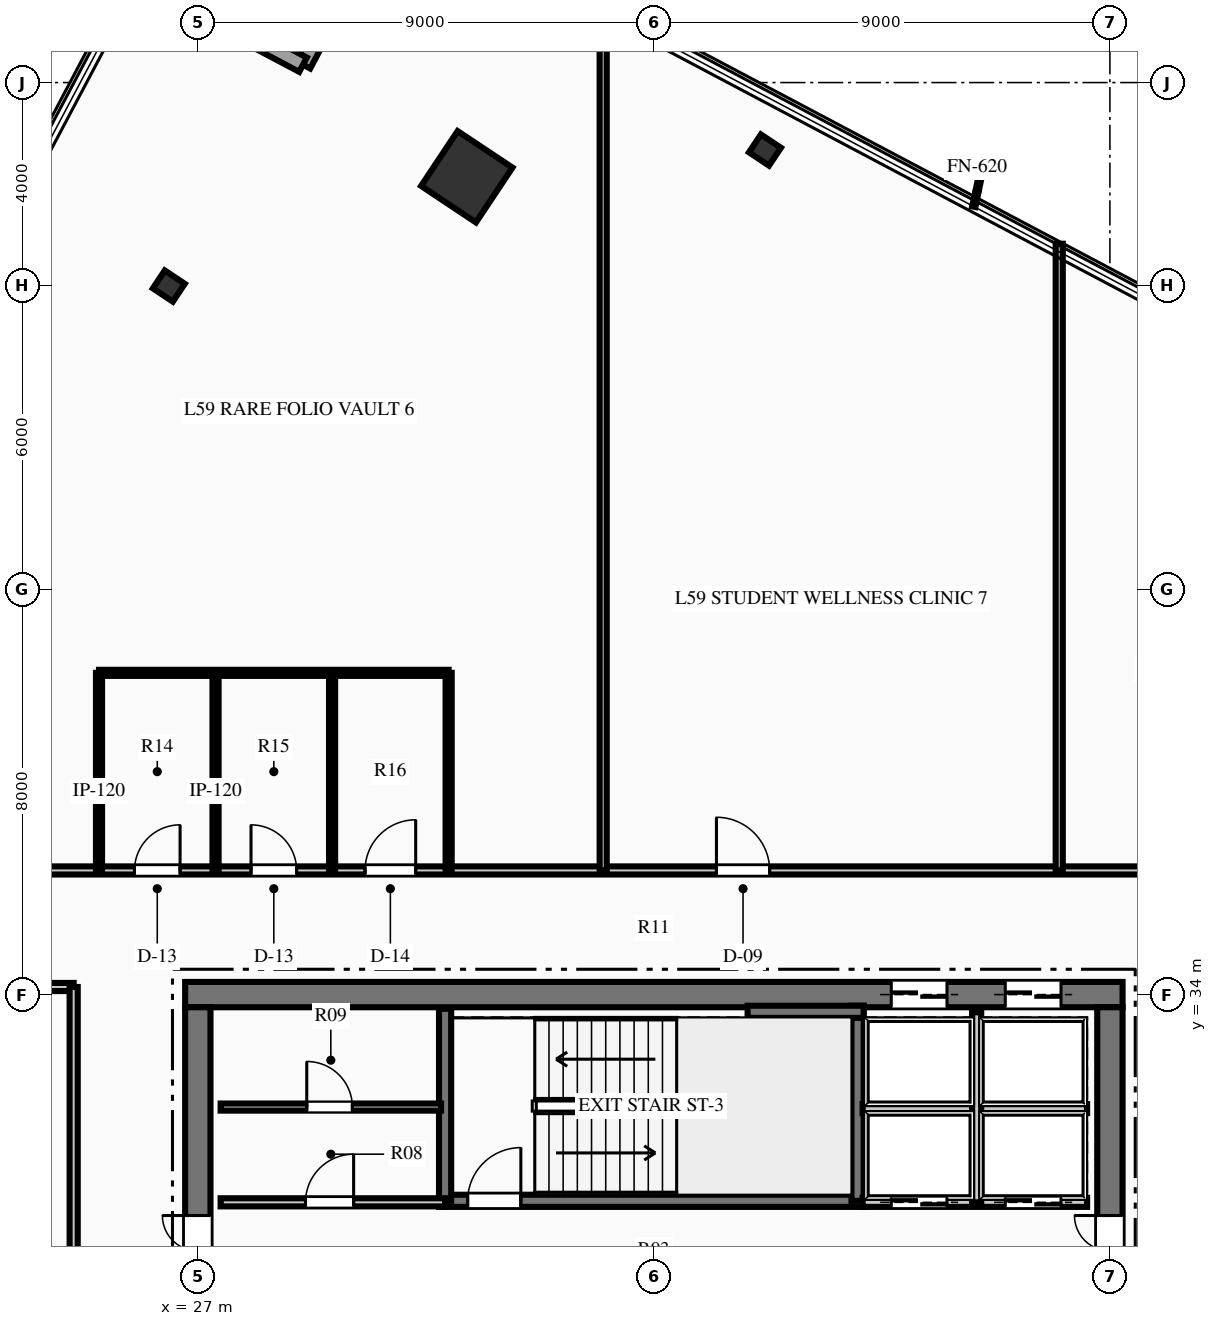
"""IFC4 building model, lengths in metres.
Left out: names, types, materials, properties, quantities, classifications, styles, units other than length and angle.
Written with IfcOpenShell. Run it as: python <this file> out.ifc"""

import sys

from ifc_helpers import new_model, si_unit, direction, frame, frame_2d, origin, origin_2d, place, context, subcontext, project, spatial, rectangle, hollow_rectangle, i_section, extrude, element, fill, save


model = new_model("IFC4")
c1 = context("Model", 3, precision=1e-05, world=origin(), true_north=direction((0.0, 1.0)))
c2 = subcontext(c1, "Body", "Model", "MODEL_VIEW")
j1 = project(units=[si_unit("LENGTHUNIT", "METRE"), si_unit("PLANEANGLEUNIT", "RADIAN")], contexts=[c1])
p1 = place(None, origin())
s1 = spatial("IfcSite", under=j1, at=p1, CompositionType="ELEMENT")
p2 = place(p1, origin())
s2 = spatial("IfcBuilding", under=s1, at=p2, CompositionType="ELEMENT")
p3 = place(p2, frame((0.0, 0.0, 235.95)))
s3 = spatial("IfcBuildingStorey", under=s2, at=p3, CompositionType="ELEMENT", Elevation=235.95)
p4 = place(p3, frame((26.75, 34.0, 0.0), z_axis=(0.0, 0.0, 1.0), x_axis=(1.0, 0.0, 0.0)))
e1 = element("IfcWall", 1, at=p4, inside=s3, PredefinedType="SHEAR", context=c2, shape_type="SweptSolid", body=[
    extrude(rectangle(XDim=18.5, YDim=0.5, at=frame_2d((9.25, 0.0))), origin(), (0.0, 0.0, 1.0), 3.75),
])
p5 = place(p4, frame((13.935, 0.0, 0.0)))
e2 = element("IfcOpeningElement", 2, at=p5, cuts=e1, PredefinedType="OPENING", context=c2, shape_type="SweptSolid", body=[
    extrude(rectangle(XDim=1.1, YDim=2.15, at=frame_2d((0.55, 1.075))), frame((0.0, 0.26, 0.0), z_axis=(0.0, -1.0, 0.0), x_axis=(1.0, 0.0, 0.0)), (0.0, 0.0, 1.0), 0.52),
])
p6 = place(p4, frame((16.185, 0.0, 0.0)))
e3 = element("IfcOpeningElement", 3, at=p6, cuts=e1, PredefinedType="OPENING", context=c2, shape_type="SweptSolid", body=[
    extrude(rectangle(XDim=1.1, YDim=2.15, at=frame_2d((0.55, 1.075))), frame((0.0, 0.26, 0.0), z_axis=(0.0, -1.0, 0.0), x_axis=(1.0, 0.0, 0.0)), (0.0, 0.0, 1.0), 0.52),
])
p7 = place(p3, frame((27.0, 18.25, 0.0), z_axis=(0.0, 0.0, 1.0), x_axis=(0.0, 1.0, 0.0)))
e4 = element("IfcWall", 4, at=p7, inside=s3, PredefinedType="SHEAR", context=c2, shape_type="SweptSolid", body=[
    extrude(rectangle(XDim=15.5, YDim=0.5, at=frame_2d((7.75, 0.0))), origin(), (0.0, 0.0, 1.0), 3.75),
])
p8 = place(p7, frame((9.99, 0.0, 0.0)))
e5 = element("IfcOpeningElement", 5, at=p8, cuts=e4, PredefinedType="OPENING", context=c2, shape_type="SweptSolid", body=[
    extrude(rectangle(XDim=1.4, YDim=2.2, at=frame_2d((0.7, 1.1))), frame((0.0, 0.26, 0.0), z_axis=(0.0, -1.0, 0.0), x_axis=(1.0, 0.0, 0.0)), (0.0, 0.0, 1.0), 0.52),
])
p9 = place(p3, frame((45.0, 18.25, 0.0), z_axis=(0.0, 0.0, 1.0), x_axis=(0.0, 1.0, 0.0)))
e6 = element("IfcWall", 6, at=p9, inside=s3, PredefinedType="SHEAR", context=c2, shape_type="SweptSolid", body=[
    extrude(rectangle(XDim=15.5, YDim=0.5, at=frame_2d((7.75, 0.0))), origin(), (0.0, 0.0, 1.0), 3.75),
])
p10 = place(p9, frame((9.99, 0.0, 0.0)))
e7 = element("IfcOpeningElement", 7, at=p10, cuts=e6, PredefinedType="OPENING", context=c2, shape_type="SweptSolid", body=[
    extrude(rectangle(XDim=1.4, YDim=2.2, at=frame_2d((0.7, 1.1))), frame((0.0, 0.26, 0.0), z_axis=(0.0, -1.0, 0.0), x_axis=(1.0, 0.0, 0.0)), (0.0, 0.0, 1.0), 0.52),
])
p11 = place(p3, frame((31.76, 29.93, 0.0), z_axis=(0.0, 0.0, 1.0), x_axis=(1.0, 0.0, 0.0)))
e8 = element("IfcWall", 8, at=p11, inside=s3, PredefinedType="SHEAR", context=c2, shape_type="SweptSolid", body=[
    extrude(rectangle(XDim=8.38, YDim=0.24, at=frame_2d((4.19, 0.0))), origin(), (0.0, 0.0, 1.0), 3.75),
])
p12 = place(p11, frame((0.565, 0.0, 0.0)))
e9 = element("IfcOpeningElement", 9, at=p12, cuts=e8, PredefinedType="OPENING", context=c2, shape_type="SweptSolid", body=[
    extrude(rectangle(XDim=1.05, YDim=2.15, at=frame_2d((0.525, 1.075))), frame((0.0, 0.13, 0.0), z_axis=(0.0, -1.0, 0.0), x_axis=(1.0, 0.0, 0.0)), (0.0, 0.0, 1.0), 0.26),
])
p13 = place(p3, frame((31.88, 29.93, 0.0), z_axis=(0.0, 0.0, 1.0), x_axis=(0.0, 1.0, 0.0)))
e10 = element("IfcWall", 10, at=p13, inside=s3, PredefinedType="SHEAR", context=c2, shape_type="SweptSolid", body=[
    extrude(rectangle(XDim=3.79, YDim=0.24, at=frame_2d((1.895, 0.0))), origin(), (0.0, 0.0, 1.0), 3.75),
])
p14 = place(p3, frame((40.02, 29.93, 0.0), z_axis=(0.0, 0.0, 1.0), x_axis=(0.0, 1.0, 0.0)))
e11 = element("IfcWall", 11, at=p14, inside=s3, PredefinedType="SHEAR", context=c2, shape_type="SweptSolid", body=[
    extrude(rectangle(XDim=3.85, YDim=0.24, at=frame_2d((1.925, 0.0))), origin(), (0.0, 0.0, 1.0), 3.75),
])
p15 = place(p3, frame((37.85, 33.66, 0.0), z_axis=(0.0, 0.0, 1.0), x_axis=(1.0, 0.0, 0.0)))
e12 = element("IfcWall", 12, at=p15, inside=s3, PredefinedType="SHEAR", context=c2, shape_type="SweptSolid", body=[
    extrude(rectangle(XDim=2.29, YDim=0.24, at=frame_2d((1.145, 0.0))), origin(), (0.0, 0.0, 1.0), 3.75),
])
p16 = place(p3, frame((32.308, 50.141, 0.0), z_axis=(0.0, 0.0, 1.0), x_axis=(0.554118199338, 0.832437998389, 0.0)))
e13 = element("IfcColumn", 13, at=p16, inside=s3, PredefinedType="COLUMN", context=c2, shape_type="SweptSolid", body=[
    extrude(hollow_rectangle(XDim=1.3, YDim=1.3, WallThickness=0.06, at=origin_2d()), origin(), (0.0, 0.0, 1.0), 3.75),
])
for number, where, z_axis, x_axis in (
    (14, (38.193, 50.668, 0.0), (0.0, 0.0, 1.0), (0.554, 0.832, 0.0)),
    (15, (26.428, 47.984, 0.0), (0.0, 0.0, 1.0), (0.554, 0.832, 0.0)),
):
    element("IfcColumn", number, at=place(p3, frame(where, z_axis=z_axis, x_axis=x_axis)), inside=s3, PredefinedType="COLUMN", context=c2, shape_type="SweptSolid", body=[
        extrude(i_section(OverallWidth=0.424, OverallDepth=0.474, WebThickness=0.048, FlangeThickness=0.077, at=origin_2d()), origin(), (0.0, 0.0, 1.0), 3.75),
    ])
p17 = place(p3, frame((29.076, 52.353, 0.0), z_axis=(0.0, 0.0, 1.0), x_axis=(0.467925110021, 0.883768120839, 0.0)))
e16 = element("IfcWall", 16, at=p17, inside=s3, PredefinedType="STANDARD", context=c2, shape_type="SweptSolid", body=[
    extrude(rectangle(XDim=3.9, YDim=0.32, at=frame_2d((1.95, 0.0))), origin(), (0.0, 0.0, 1.0), 3.4),
])
p18 = place(p3, frame((25.63, 54.178, 0.0), z_axis=(0.0, 0.0, 1.0), x_axis=(0.883754413477, -0.46795099814, 0.0)))
e17 = element("IfcWall", 17, at=p18, inside=s3, PredefinedType="STANDARD", context=c2, shape_type="SweptSolid", body=[
    extrude(rectangle(XDim=3.9, YDim=0.32, at=frame_2d((1.95, 0.0))), origin(), (0.0, 0.0, 1.0), 3.4),
])
p19 = place(p18, frame((1.25, 0.0, 0.85)))
e18 = element("IfcOpeningElement", 18, at=p19, cuts=e17, PredefinedType="OPENING", context=c2, shape_type="SweptSolid", body=[
    extrude(rectangle(XDim=1.4, YDim=2.0, at=frame_2d((0.7, 1.0))), frame((0.0, 0.17, 0.0), z_axis=(0.0, -1.0, 0.0), x_axis=(1.0, 0.0, 0.0)), (0.0, 0.0, 1.0), 0.34),
])
p20 = place(p3, frame((27.45, 29.9, 0.0), z_axis=(0.0, 0.0, 1.0), x_axis=(1.0, 0.0, 0.0)))
e19 = element("IfcWall", 19, at=p20, inside=s3, PredefinedType="PARTITIONING", context=c2, shape_type="SweptSolid", body=[
    extrude(rectangle(XDim=4.43, YDim=0.16, at=frame_2d((2.215, 0.0))), origin(), (0.0, 0.0, 1.0), 3.4),
])
p21 = place(p20, frame((1.675, 0.0, 0.0)))
e20 = element("IfcOpeningElement", 20, at=p21, cuts=e19, PredefinedType="OPENING", context=c2, shape_type="SweptSolid", body=[
    extrude(rectangle(XDim=0.95, YDim=2.15, at=frame_2d((0.475, 1.075))), frame((0.0, 0.09, 0.0), z_axis=(0.0, -1.0, 0.0), x_axis=(1.0, 0.0, 0.0)), (0.0, 0.0, 1.0), 0.18),
])
p22 = place(p3, frame((27.45, 31.78, 0.0), z_axis=(0.0, 0.0, 1.0), x_axis=(1.0, 0.0, 0.0)))
e21 = element("IfcWall", 21, at=p22, inside=s3, PredefinedType="PARTITIONING", context=c2, shape_type="SweptSolid", body=[
    extrude(rectangle(XDim=4.35, YDim=0.14, at=frame_2d((2.175, 0.0))), origin(), (0.0, 0.0, 1.0), 3.4),
])
p23 = place(p22, frame((1.7, 0.0, 0.0)))
e22 = element("IfcOpeningElement", 22, at=p23, cuts=e21, PredefinedType="OPENING", context=c2, shape_type="SweptSolid", body=[
    extrude(rectangle(XDim=0.9, YDim=2.15, at=frame_2d((0.45, 1.075))), frame((0.0, 0.08, 0.0), z_axis=(0.0, -1.0, 0.0), x_axis=(1.0, 0.0, 0.0)), (0.0, 0.0, 1.0), 0.16),
])
p24 = place(p3, frame((40.12, 29.9, 0.0), z_axis=(0.0, 0.0, 1.0), x_axis=(1.0, 0.0, 0.0)))
e23 = element("IfcWall", 23, at=p24, inside=s3, PredefinedType="PARTITIONING", context=c2, shape_type="SweptSolid", body=[
    extrude(rectangle(XDim=4.43, YDim=0.18, at=frame_2d((2.215, 0.0))), origin(), (0.0, 0.0, 1.0), 3.4),
])
p25 = place(p24, frame((0.565, 0.0, 0.0)))
e24 = element("IfcOpeningElement", 24, at=p25, cuts=e23, PredefinedType="OPENING", context=c2, shape_type="SweptSolid", body=[
    extrude(rectangle(XDim=1.1, YDim=2.15, at=frame_2d((0.55, 1.075))), frame((0.0, 0.1, 0.0), z_axis=(0.0, -1.0, 0.0), x_axis=(1.0, 0.0, 0.0)), (0.0, 0.0, 1.0), 0.2),
])
p26 = place(p24, frame((2.815, 0.0, 0.0)))
e25 = element("IfcOpeningElement", 25, at=p26, cuts=e23, PredefinedType="OPENING", context=c2, shape_type="SweptSolid", body=[
    extrude(rectangle(XDim=1.1, YDim=2.15, at=frame_2d((0.55, 1.075))), frame((0.0, 0.1, 0.0), z_axis=(0.0, -1.0, 0.0), x_axis=(1.0, 0.0, 0.0)), (0.0, 0.0, 1.0), 0.2),
])
p27 = place(p3, frame((40.12, 31.75, 0.0), z_axis=(0.0, 0.0, 1.0), x_axis=(1.0, 0.0, 0.0)))
e26 = element("IfcWall", 26, at=p27, inside=s3, PredefinedType="PARTITIONING", context=c2, shape_type="SweptSolid", body=[
    extrude(rectangle(XDim=4.43, YDim=0.18, at=frame_2d((2.215, 0.0))), origin(), (0.0, 0.0, 1.0), 3.4),
])
p28 = place(p3, frame((42.37, 29.9, 0.0), z_axis=(0.0, 0.0, 1.0), x_axis=(0.0, 1.0, 0.0)))
e27 = element("IfcWall", 27, at=p28, inside=s3, PredefinedType="PARTITIONING", context=c2, shape_type="SweptSolid", body=[
    extrude(rectangle(XDim=3.75, YDim=0.18, at=frame_2d((1.875, 0.0))), origin(), (0.0, 0.0, 1.0), 3.4),
])
p29 = place(p3, frame((18.2, 36.45, 0.0), z_axis=(0.0, 0.0, 1.0), x_axis=(1.0, 0.0, 0.0)))
e28 = element("IfcWall", 28, at=p29, inside=s3, PredefinedType="PARTITIONING", context=c2, shape_type="SweptSolid", body=[
    extrude(rectangle(XDim=35.6, YDim=0.16, at=frame_2d((17.8, 0.0))), origin(), (0.0, 0.0, 1.0), 2.779),
])
p30 = place(p29, frame((7.55, 0.0, 0.0)))
e29 = element("IfcOpeningElement", 29, at=p30, cuts=e28, PredefinedType="OPENING", context=c2, shape_type="SweptSolid", body=[
    extrude(rectangle(XDim=0.9, YDim=2.15, at=frame_2d((0.45, 1.075))), frame((0.0, 0.09, 0.0), z_axis=(0.0, -1.0, 0.0), x_axis=(1.0, 0.0, 0.0)), (0.0, 0.0, 1.0), 0.18),
])
p31 = place(p29, frame((9.85, 0.0, 0.0)))
e30 = element("IfcOpeningElement", 30, at=p31, cuts=e28, PredefinedType="OPENING", context=c2, shape_type="SweptSolid", body=[
    extrude(rectangle(XDim=0.9, YDim=2.15, at=frame_2d((0.45, 1.075))), frame((0.0, 0.09, 0.0), z_axis=(0.0, -1.0, 0.0), x_axis=(1.0, 0.0, 0.0)), (0.0, 0.0, 1.0), 0.18),
])
p32 = place(p29, frame((12.1, 0.0, 0.0)))
e31 = element("IfcOpeningElement", 31, at=p32, cuts=e28, PredefinedType="OPENING", context=c2, shape_type="SweptSolid", body=[
    extrude(rectangle(XDim=1.0, YDim=2.15, at=frame_2d((0.5, 1.075))), frame((0.0, 0.09, 0.0), z_axis=(0.0, -1.0, 0.0), x_axis=(1.0, 0.0, 0.0)), (0.0, 0.0, 1.0), 0.18),
])
p33 = place(p29, frame((4.345, 0.0, 0.0)))
e32 = element("IfcOpeningElement", 32, at=p33, cuts=e28, PredefinedType="OPENING", context=c2, shape_type="SweptSolid", body=[
    extrude(rectangle(XDim=1.05, YDim=2.15, at=frame_2d((0.525, 1.075))), frame((0.0, 0.09, 0.0), z_axis=(0.0, -1.0, 0.0), x_axis=(1.0, 0.0, 0.0)), (0.0, 0.0, 1.0), 0.18),
])
p34 = place(p29, frame((19.035, 0.0, 0.0)))
e33 = element("IfcOpeningElement", 33, at=p34, cuts=e28, PredefinedType="OPENING", context=c2, shape_type="SweptSolid", body=[
    extrude(rectangle(XDim=1.05, YDim=2.15, at=frame_2d((0.525, 1.075))), frame((0.0, 0.09, 0.0), z_axis=(0.0, -1.0, 0.0), x_axis=(1.0, 0.0, 0.0)), (0.0, 0.0, 1.0), 0.18),
])
p35 = place(p29, frame((31.833, 0.0, 0.0)))
e34 = element("IfcOpeningElement", 34, at=p35, cuts=e28, PredefinedType="OPENING", context=c2, shape_type="SweptSolid", body=[
    extrude(rectangle(XDim=1.05, YDim=2.15, at=frame_2d((0.525, 1.075))), frame((0.0, 0.09, 0.0), z_axis=(0.0, -1.0, 0.0), x_axis=(1.0, 0.0, 0.0)), (0.0, 0.0, 1.0), 0.18),
])
p36 = place(p3, frame((18.2, 34.15, 0.0), z_axis=(0.0, 0.0, 1.0), x_axis=(1.0, 0.0, 0.0)))
e35 = element("IfcWall", 35, at=p36, inside=s3, PredefinedType="PARTITIONING", context=c2, shape_type="SweptSolid", body=[
    extrude(rectangle(XDim=6.35, YDim=0.16, at=frame_2d((3.175, 0.0))), origin(), (0.0, 0.0, 1.0), 3.4),
])
p37 = place(p3, frame((24.55, 17.85, 0.0), z_axis=(0.0, 0.0, 1.0), x_axis=(0.0, 1.0, 0.0)))
e36 = element("IfcWall", 36, at=p37, inside=s3, PredefinedType="PARTITIONING", context=c2, shape_type="SweptSolid", body=[
    extrude(rectangle(XDim=16.3, YDim=0.16, at=frame_2d((8.15, 0.0))), origin(), (0.0, 0.0, 1.0), 3.4),
])
p38 = place(p37, frame((2.775, 0.0, 0.0)))
e37 = element("IfcOpeningElement", 37, at=p38, cuts=e36, PredefinedType="OPENING", context=c2, shape_type="SweptSolid", body=[
    extrude(rectangle(XDim=0.95, YDim=2.15, at=frame_2d((0.475, 1.075))), frame((0.0, 0.09, 0.0), z_axis=(0.0, -1.0, 0.0), x_axis=(1.0, 0.0, 0.0)), (0.0, 0.0, 1.0), 0.18),
])
p39 = place(p37, frame((8.729, 0.0, 0.0)))
e38 = element("IfcOpeningElement", 38, at=p39, cuts=e36, PredefinedType="OPENING", context=c2, shape_type="SweptSolid", body=[
    extrude(rectangle(XDim=1.05, YDim=2.15, at=frame_2d((0.525, 1.075))), frame((0.0, 0.09, 0.0), z_axis=(0.0, -1.0, 0.0), x_axis=(1.0, 0.0, 0.0)), (0.0, 0.0, 1.0), 0.18),
])
for number, where, z_axis, x_axis in (
    (39, (25.05, 36.45, 0.0), (0.0, 0.0, 1.0), (0.0, 1.0, 0.0)),
    (40, (27.35, 36.45, 0.0), (0.0, 0.0, 1.0), (0.0, 1.0, 0.0)),
    (41, (29.65, 36.45, 0.0), (0.0, 0.0, 1.0), (0.0, 1.0, 0.0)),
):
    element("IfcWall", number, at=place(p3, frame(where, z_axis=z_axis, x_axis=x_axis)), inside=s3, PredefinedType="PARTITIONING", context=c2, shape_type="SweptSolid", body=[
        extrude(rectangle(XDim=3.9, YDim=0.12, at=frame_2d((1.95, 0.0))), origin(), (0.0, 0.0, 1.0), 3.4),
    ])
p40 = place(p3, frame((31.95, 36.45, 0.0), z_axis=(0.0, 0.0, 1.0), x_axis=(0.0, 1.0, 0.0)))
e42 = element("IfcWall", 42, at=p40, inside=s3, PredefinedType="PARTITIONING", context=c2, shape_type="SweptSolid", body=[
    extrude(rectangle(XDim=3.9, YDim=0.12, at=frame_2d((1.95, 0.0))), origin(), (0.0, 0.0, 1.0), 2.779),
])
p41 = place(p3, frame((25.05, 40.35, 0.0), z_axis=(0.0, 0.0, 1.0), x_axis=(1.0, 0.0, 0.0)))
e43 = element("IfcWall", 43, at=p41, inside=s3, PredefinedType="PARTITIONING", context=c2, shape_type="SweptSolid", body=[
    extrude(rectangle(XDim=6.9, YDim=0.12, at=frame_2d((3.45, 0.0))), origin(), (0.0, 0.0, 1.0), 3.4),
])
p42 = place(p3, frame((35.0, 36.45, 0.0), z_axis=(0.0, 0.0, 1.0), x_axis=(0.0, 1.0, 0.0)))
e44 = element("IfcWall", 44, at=p42, inside=s3, PredefinedType="PARTITIONING", context=c2, shape_type="SweptSolid", body=[
    extrude(rectangle(XDim=17.134, YDim=0.14, at=frame_2d((8.567, 0.0))), origin(), (0.0, 0.0, 1.0), 3.4),
])
p43 = place(p3, frame((44.0, 36.45, 0.0), z_axis=(0.0, 0.0, 1.0), x_axis=(0.0, 1.0, 0.0)))
e45 = element("IfcWall", 45, at=p43, inside=s3, PredefinedType="PARTITIONING", context=c2, shape_type="SweptSolid", body=[
    extrude(rectangle(XDim=12.369, YDim=0.14, at=frame_2d((6.185, 0.0))), origin(), (0.0, 0.0, 1.0), 3.4),
])
p44 = place(p21, origin())
e46 = element("IfcDoor", 46, at=p44, inside=s3, OperationType="SINGLE_SWING_RIGHT", PredefinedType="DOOR", context=c2, shape_type="SweptSolid", body=[
    extrude(rectangle(XDim=0.95, YDim=2.15, at=frame_2d((0.475, 1.075))), frame((0.0, 0.025, 0.0), z_axis=(0.0, -1.0, 0.0), x_axis=(1.0, 0.0, 0.0)), (0.0, 0.0, 1.0), 0.05),
])
fill(e20, e46)
p45 = place(p23, origin())
e47 = element("IfcDoor", 47, at=p45, inside=s3, OperationType="SINGLE_SWING_LEFT", PredefinedType="DOOR", context=c2, shape_type="SweptSolid", body=[
    extrude(rectangle(XDim=0.9, YDim=2.15, at=frame_2d((0.45, 1.075))), frame((0.0, 0.025, 0.0), z_axis=(0.0, -1.0, 0.0), x_axis=(1.0, 0.0, 0.0)), (0.0, 0.0, 1.0), 0.05),
])
fill(e22, e47)
p46 = place(p12, origin())
e48 = element("IfcDoor", 48, at=p46, inside=s3, OperationType="SINGLE_SWING_RIGHT", PredefinedType="DOOR", context=c2, shape_type="SweptSolid", body=[
    extrude(rectangle(XDim=1.05, YDim=2.15, at=frame_2d((0.525, 1.075))), frame((0.0, 0.025, 0.0), z_axis=(0.0, -1.0, 0.0), x_axis=(1.0, 0.0, 0.0)), (0.0, 0.0, 1.0), 0.05),
])
fill(e9, e48)
p47 = place(p8, origin())
e49 = element("IfcDoor", 49, at=p47, inside=s3, OperationType="DOUBLE_DOOR_SINGLE_SWING", PredefinedType="DOOR", context=c2, shape_type="SweptSolid", body=[
    extrude(rectangle(XDim=1.4, YDim=2.2, at=frame_2d((0.7, 1.1))), frame((0.0, 0.025, 0.0), z_axis=(0.0, -1.0, 0.0), x_axis=(1.0, 0.0, 0.0)), (0.0, 0.0, 1.0), 0.05),
])
fill(e5, e49)
p48 = place(p10, origin())
e50 = element("IfcDoor", 50, at=p48, inside=s3, OperationType="DOUBLE_DOOR_SINGLE_SWING", PredefinedType="DOOR", context=c2, shape_type="SweptSolid", body=[
    extrude(rectangle(XDim=1.4, YDim=2.2, at=frame_2d((0.7, 1.1))), frame((0.0, 0.025, 0.0), z_axis=(0.0, -1.0, 0.0), x_axis=(1.0, 0.0, 0.0)), (0.0, 0.0, 1.0), 0.05),
])
fill(e7, e50)
p49 = place(p30, origin())
e51 = element("IfcDoor", 51, at=p49, inside=s3, OperationType="SINGLE_SWING_RIGHT", PredefinedType="DOOR", context=c2, shape_type="SweptSolid", body=[
    extrude(rectangle(XDim=0.9, YDim=2.15, at=frame_2d((0.45, 1.075))), frame((0.0, 0.025, 0.0), z_axis=(0.0, -1.0, 0.0), x_axis=(1.0, 0.0, 0.0)), (0.0, 0.0, 1.0), 0.05),
])
fill(e29, e51)
p50 = place(p31, origin())
e52 = element("IfcDoor", 52, at=p50, inside=s3, OperationType="SINGLE_SWING_LEFT", PredefinedType="DOOR", context=c2, shape_type="SweptSolid", body=[
    extrude(rectangle(XDim=0.9, YDim=2.15, at=frame_2d((0.45, 1.075))), frame((0.0, 0.025, 0.0), z_axis=(0.0, -1.0, 0.0), x_axis=(1.0, 0.0, 0.0)), (0.0, 0.0, 1.0), 0.05),
])
fill(e30, e52)
p51 = place(p32, origin())
e53 = element("IfcDoor", 53, at=p51, inside=s3, OperationType="SINGLE_SWING_RIGHT", PredefinedType="DOOR", context=c2, shape_type="SweptSolid", body=[
    extrude(rectangle(XDim=1.0, YDim=2.15, at=frame_2d((0.5, 1.075))), frame((0.0, 0.025, 0.0), z_axis=(0.0, -1.0, 0.0), x_axis=(1.0, 0.0, 0.0)), (0.0, 0.0, 1.0), 0.05),
])
fill(e31, e53)
p52 = place(p34, origin())
e54 = element("IfcDoor", 54, at=p52, inside=s3, OperationType="SINGLE_SWING_LEFT", PredefinedType="DOOR", context=c2, shape_type="SweptSolid", body=[
    extrude(rectangle(XDim=1.05, YDim=2.15, at=frame_2d((0.525, 1.075))), frame((0.0, 0.025, 0.0), z_axis=(0.0, -1.0, 0.0), x_axis=(1.0, 0.0, 0.0)), (0.0, 0.0, 1.0), 0.05),
])
fill(e33, e54)
p53 = place(p25, origin())
e55 = element("IfcDoor", 55, at=p53, inside=s3, OperationType="SLIDING_TO_LEFT", PredefinedType="DOOR", context=c2, shape_type="SweptSolid", body=[
    extrude(rectangle(XDim=1.1, YDim=2.15, at=frame_2d((0.55, 1.075))), frame((0.0, 0.025, 0.0), z_axis=(0.0, -1.0, 0.0), x_axis=(1.0, 0.0, 0.0)), (0.0, 0.0, 1.0), 0.05),
])
fill(e24, e55)
p54 = place(p26, origin())
e56 = element("IfcDoor", 56, at=p54, inside=s3, OperationType="SLIDING_TO_LEFT", PredefinedType="DOOR", context=c2, shape_type="SweptSolid", body=[
    extrude(rectangle(XDim=1.1, YDim=2.15, at=frame_2d((0.55, 1.075))), frame((0.0, 0.025, 0.0), z_axis=(0.0, -1.0, 0.0), x_axis=(1.0, 0.0, 0.0)), (0.0, 0.0, 1.0), 0.05),
])
fill(e25, e56)
p55 = place(p5, origin())
e57 = element("IfcDoor", 57, at=p55, inside=s3, OperationType="SLIDING_TO_LEFT", PredefinedType="DOOR", context=c2, shape_type="SweptSolid", body=[
    extrude(rectangle(XDim=1.1, YDim=2.15, at=frame_2d((0.55, 1.075))), frame((0.0, 0.025, 0.0), z_axis=(0.0, -1.0, 0.0), x_axis=(1.0, 0.0, 0.0)), (0.0, 0.0, 1.0), 0.05),
])
fill(e2, e57)
p56 = place(p6, origin())
e58 = element("IfcDoor", 58, at=p56, inside=s3, OperationType="SLIDING_TO_LEFT", PredefinedType="DOOR", context=c2, shape_type="SweptSolid", body=[
    extrude(rectangle(XDim=1.1, YDim=2.15, at=frame_2d((0.55, 1.075))), frame((0.0, 0.025, 0.0), z_axis=(0.0, -1.0, 0.0), x_axis=(1.0, 0.0, 0.0)), (0.0, 0.0, 1.0), 0.05),
])
fill(e3, e58)
save(model, sys.argv[1])
